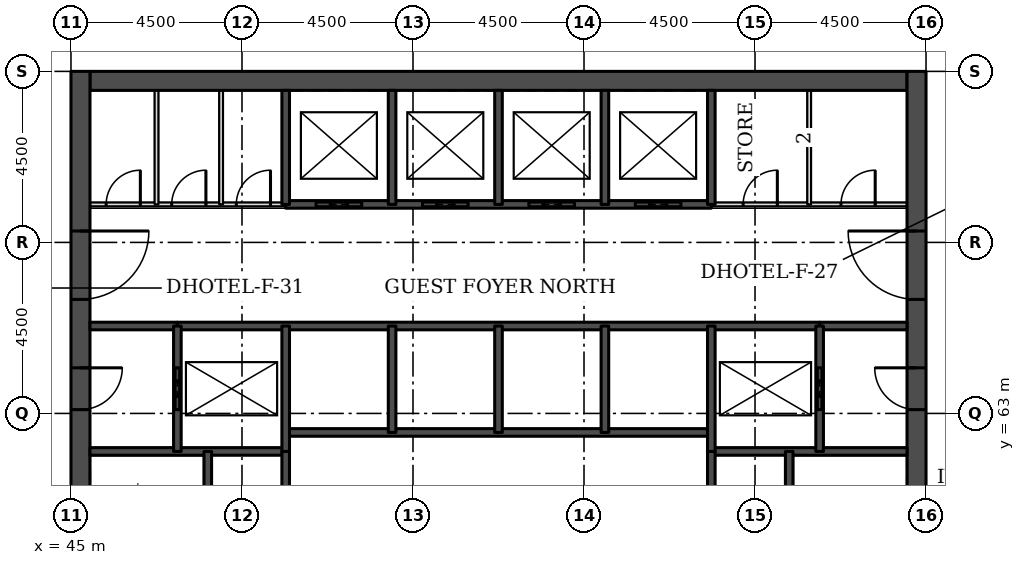
"""IFC4 building model, lengths in metres.
Left out: names, types, materials, properties, quantities, classifications, styles, units other than length and angle.
Written with IfcOpenShell. Run it as: python <this file> out.ifc"""

import sys

from ifc_helpers import new_model, si_unit, direction, frame, frame_2d, origin, place, context, subcontext, project, spatial, rectangle, extrude, element, fill, save


model = new_model("IFC4")
c1 = context("Model", 3, precision=1e-05, world=origin(), true_north=direction((0.0, 1.0)))
c2 = subcontext(c1, "Body", "Model", "MODEL_VIEW")
j1 = project(units=[si_unit("LENGTHUNIT", "METRE"), si_unit("PLANEANGLEUNIT", "RADIAN")], contexts=[c1])
p1 = place(None, origin())
s1 = spatial("IfcSite", under=j1, at=p1, CompositionType="ELEMENT")
p2 = place(p1, origin())
s2 = spatial("IfcBuilding", under=s1, at=p2, CompositionType="ELEMENT")
p3 = place(p2, frame((0.0, 0.0, 42.9)))
s3 = spatial("IfcBuildingStorey", under=s2, at=p3, CompositionType="ELEMENT", Elevation=42.9)
p4 = place(p3, frame((45.5, 71.75, 0.0), z_axis=(0.0, 0.0, 1.0), x_axis=(1.0, 0.0, 0.0)))
e1 = element("IfcWall", 1, at=p4, inside=s3, PredefinedType="SHEAR", context=c2, shape_type="SweptSolid", body=[
    extrude(rectangle(XDim=21.5, YDim=0.5, at=frame_2d((10.75, 0.0))), origin(), (0.0, 0.0, 1.0), 3.3),
])
p5 = place(p3, frame((45.25, 49.5, 0.0), z_axis=(0.0, 0.0, 1.0), x_axis=(0.0, 1.0, 0.0)))
e2 = element("IfcWall", 2, at=p5, inside=s3, PredefinedType="SHEAR", context=c2, shape_type="SweptSolid", body=[
    extrude(rectangle(XDim=22.5, YDim=0.5, at=frame_2d((11.25, 0.0))), origin(), (0.0, 0.0, 1.0), 3.3),
])
p6 = place(p5, frame((4.2, 0.0, 0.0)))
e3 = element("IfcOpeningElement", 3, at=p6, cuts=e2, PredefinedType="OPENING", context=c2, shape_type="SweptSolid", body=[
    extrude(rectangle(XDim=1.8, YDim=2.1, at=frame_2d((0.9, 1.05))), frame((0.0, 0.26, 0.0), z_axis=(0.0, -1.0, 0.0), x_axis=(1.0, 0.0, 0.0)), (0.0, 0.0, 1.0), 0.52),
])
p7 = place(p5, frame((6.9, 0.0, 0.0)))
e4 = element("IfcOpeningElement", 4, at=p7, cuts=e2, PredefinedType="OPENING", context=c2, shape_type="SweptSolid", body=[
    extrude(rectangle(XDim=1.1, YDim=2.1, at=frame_2d((0.55, 1.05))), frame((0.0, 0.26, 0.0), z_axis=(0.0, -1.0, 0.0), x_axis=(1.0, 0.0, 0.0)), (0.0, 0.0, 1.0), 0.52),
])
p8 = place(p5, frame((13.6, 0.0, 0.0)))
e5 = element("IfcOpeningElement", 5, at=p8, cuts=e2, PredefinedType="OPENING", context=c2, shape_type="SweptSolid", body=[
    extrude(rectangle(XDim=1.1, YDim=2.1, at=frame_2d((0.55, 1.05))), frame((0.0, 0.26, 0.0), z_axis=(0.0, -1.0, 0.0), x_axis=(1.0, 0.0, 0.0)), (0.0, 0.0, 1.0), 0.52),
])
p9 = place(p5, frame((16.5, 0.0, 0.0)))
e6 = element("IfcOpeningElement", 6, at=p9, cuts=e2, PredefinedType="OPENING", context=c2, shape_type="SweptSolid", body=[
    extrude(rectangle(XDim=1.8, YDim=2.1, at=frame_2d((0.9, 1.05))), frame((0.0, 0.26, 0.0), z_axis=(0.0, -1.0, 0.0), x_axis=(1.0, 0.0, 0.0)), (0.0, 0.0, 1.0), 0.52),
])
p10 = place(p3, frame((67.25, 49.5, 0.0), z_axis=(0.0, 0.0, 1.0), x_axis=(0.0, 1.0, 0.0)))
e7 = element("IfcWall", 7, at=p10, inside=s3, PredefinedType="SHEAR", context=c2, shape_type="SweptSolid", body=[
    extrude(rectangle(XDim=22.5, YDim=0.5, at=frame_2d((11.25, 0.0))), origin(), (0.0, 0.0, 1.0), 3.3),
])
p11 = place(p10, frame((4.2, 0.0, 0.0)))
e8 = element("IfcOpeningElement", 8, at=p11, cuts=e7, PredefinedType="OPENING", context=c2, shape_type="SweptSolid", body=[
    extrude(rectangle(XDim=1.8, YDim=2.1, at=frame_2d((0.9, 1.05))), frame((0.0, 0.26, 0.0), z_axis=(0.0, -1.0, 0.0), x_axis=(1.0, 0.0, 0.0)), (0.0, 0.0, 1.0), 0.52),
])
p12 = place(p10, frame((6.9, 0.0, 0.0)))
e9 = element("IfcOpeningElement", 9, at=p12, cuts=e7, PredefinedType="OPENING", context=c2, shape_type="SweptSolid", body=[
    extrude(rectangle(XDim=1.1, YDim=2.1, at=frame_2d((0.55, 1.05))), frame((0.0, 0.26, 0.0), z_axis=(0.0, -1.0, 0.0), x_axis=(1.0, 0.0, 0.0)), (0.0, 0.0, 1.0), 0.52),
])
p13 = place(p10, frame((13.6, 0.0, 0.0)))
e10 = element("IfcOpeningElement", 10, at=p13, cuts=e7, PredefinedType="OPENING", context=c2, shape_type="SweptSolid", body=[
    extrude(rectangle(XDim=1.1, YDim=2.1, at=frame_2d((0.55, 1.05))), frame((0.0, 0.26, 0.0), z_axis=(0.0, -1.0, 0.0), x_axis=(1.0, 0.0, 0.0)), (0.0, 0.0, 1.0), 0.52),
])
p14 = place(p10, frame((16.5, 0.0, 0.0)))
e11 = element("IfcOpeningElement", 11, at=p14, cuts=e7, PredefinedType="OPENING", context=c2, shape_type="SweptSolid", body=[
    extrude(rectangle(XDim=1.8, YDim=2.1, at=frame_2d((0.9, 1.05))), frame((0.0, 0.26, 0.0), z_axis=(0.0, -1.0, 0.0), x_axis=(1.0, 0.0, 0.0)), (0.0, 0.0, 1.0), 0.52),
])
for number, where, z_axis, x_axis in (
    (12, (45.5, 62.0, 0.0), (0.0, 0.0, 1.0), (1.0, 0.0, 0.0)),
    (13, (61.85, 62.0, 0.0), (0.0, 0.0, 1.0), (1.0, 0.0, 0.0)),
):
    element("IfcWall", number, at=place(p3, frame(where, z_axis=z_axis, x_axis=x_axis)), inside=s3, PredefinedType="SOLIDWALL", context=c2, shape_type="SweptSolid", body=[
        extrude(rectangle(XDim=5.15, YDim=0.2, at=frame_2d((2.575, 0.0))), origin(), (0.0, 0.0, 1.0), 3.08),
    ])
p15 = place(p3, frame((50.65, 62.5, 0.0), z_axis=(0.0, 0.0, 1.0), x_axis=(1.0, 0.0, 0.0)))
e14 = element("IfcWall", 14, at=p15, inside=s3, PredefinedType="SOLIDWALL", context=c2, shape_type="SweptSolid", body=[
    extrude(rectangle(XDim=11.2, YDim=0.2, at=frame_2d((5.6, 0.0))), origin(), (0.0, 0.0, 1.0), 3.3),
])
for number, where, z_axis, x_axis in (
    (15, (45.5, 65.3, 0.0), (0.0, 0.0, 1.0), (1.0, 0.0, 0.0)),
    (16, (64.7, 65.3, 0.0), (0.0, 0.0, 1.0), (1.0, 0.0, 0.0)),
):
    element("IfcWall", number, at=place(p3, frame(where, z_axis=z_axis, x_axis=x_axis)), inside=s3, PredefinedType="SOLIDWALL", context=c2, shape_type="SweptSolid", body=[
        extrude(rectangle(XDim=2.3, YDim=0.2, at=frame_2d((1.15, 0.0))), origin(), (0.0, 0.0, 1.0), 3.08),
    ])
p16 = place(p3, frame((47.8, 65.3, 0.0), z_axis=(0.0, 0.0, 1.0), x_axis=(1.0, 0.0, 0.0)))
e17 = element("IfcWall", 17, at=p16, inside=s3, PredefinedType="SOLIDWALL", context=c2, shape_type="SweptSolid", body=[
    extrude(rectangle(XDim=16.9, YDim=0.2, at=frame_2d((8.45, 0.0))), origin(), (0.0, 0.0, 1.0), 3.08),
])
p17 = place(p3, frame((45.5, 68.5, 0.0), z_axis=(0.0, 0.0, 1.0), x_axis=(1.0, 0.0, 0.0)))
e18 = element("IfcWall", 18, at=p17, inside=s3, PredefinedType="PARTITIONING", context=c2, shape_type="SweptSolid", body=[
    extrude(rectangle(XDim=5.15, YDim=0.1, at=frame_2d((2.575, 0.0))), origin(), (0.0, 0.0, 1.0), 3.08),
])
p18 = place(p17, frame((0.426, 0.0, 0.0)))
e19 = element("IfcOpeningElement", 19, at=p18, cuts=e18, PredefinedType="OPENING", context=c2, shape_type="SweptSolid", body=[
    extrude(rectangle(XDim=0.9, YDim=2.1, at=frame_2d((0.45, 1.05))), frame((0.0, 0.06, 0.0), z_axis=(0.0, -1.0, 0.0), x_axis=(1.0, 0.0, 0.0)), (0.0, 0.0, 1.0), 0.12),
])
p19 = place(p17, frame((2.151, 0.0, 0.0)))
e20 = element("IfcOpeningElement", 20, at=p19, cuts=e18, PredefinedType="OPENING", context=c2, shape_type="SweptSolid", body=[
    extrude(rectangle(XDim=0.9, YDim=2.1, at=frame_2d((0.45, 1.05))), frame((0.0, 0.06, 0.0), z_axis=(0.0, -1.0, 0.0), x_axis=(1.0, 0.0, 0.0)), (0.0, 0.0, 1.0), 0.12),
])
p20 = place(p17, frame((3.85, 0.0, 0.0)))
e21 = element("IfcOpeningElement", 21, at=p20, cuts=e18, PredefinedType="OPENING", context=c2, shape_type="SweptSolid", body=[
    extrude(rectangle(XDim=0.9, YDim=2.1, at=frame_2d((0.45, 1.05))), frame((0.0, 0.06, 0.0), z_axis=(0.0, -1.0, 0.0), x_axis=(1.0, 0.0, 0.0)), (0.0, 0.0, 1.0), 0.12),
])
p21 = place(p3, frame((61.85, 68.5, 0.0), z_axis=(0.0, 0.0, 1.0), x_axis=(1.0, 0.0, 0.0)))
e22 = element("IfcWall", 22, at=p21, inside=s3, PredefinedType="PARTITIONING", context=c2, shape_type="SweptSolid", body=[
    extrude(rectangle(XDim=5.15, YDim=0.1, at=frame_2d((2.575, 0.0))), origin(), (0.0, 0.0, 1.0), 3.08),
])
p22 = place(p21, frame((3.413, 0.0, 0.0)))
e23 = element("IfcOpeningElement", 23, at=p22, cuts=e22, PredefinedType="OPENING", context=c2, shape_type="SweptSolid", body=[
    extrude(rectangle(XDim=0.9, YDim=2.1, at=frame_2d((0.45, 1.05))), frame((0.0, 0.06, 0.0), z_axis=(0.0, -1.0, 0.0), x_axis=(1.0, 0.0, 0.0)), (0.0, 0.0, 1.0), 0.12),
])
p23 = place(p21, frame((0.837, 0.0, 0.0)))
e24 = element("IfcOpeningElement", 24, at=p23, cuts=e22, PredefinedType="OPENING", context=c2, shape_type="SweptSolid", body=[
    extrude(rectangle(XDim=0.9, YDim=2.1, at=frame_2d((0.45, 1.05))), frame((0.0, 0.06, 0.0), z_axis=(0.0, -1.0, 0.0), x_axis=(1.0, 0.0, 0.0)), (0.0, 0.0, 1.0), 0.12),
])
p24 = place(p3, frame((50.65, 68.5, 0.0), z_axis=(0.0, 0.0, 1.0), x_axis=(1.0, 0.0, 0.0)))
e25 = element("IfcWall", 25, at=p24, inside=s3, PredefinedType="SOLIDWALL", context=c2, shape_type="SweptSolid", body=[
    extrude(rectangle(XDim=11.2, YDim=0.2, at=frame_2d((5.6, 0.0))), origin(), (0.0, 0.0, 1.0), 3.08),
])
p25 = place(p24, frame((0.8, 0.0, 0.0)))
e26 = element("IfcOpeningElement", 26, at=p25, cuts=e25, PredefinedType="OPENING", context=c2, shape_type="SweptSolid", body=[
    extrude(rectangle(XDim=1.2, YDim=2.1, at=frame_2d((0.6, 1.05))), frame((0.0, 0.11, 0.0), z_axis=(0.0, -1.0, 0.0), x_axis=(1.0, 0.0, 0.0)), (0.0, 0.0, 1.0), 0.22),
])
p26 = place(p24, frame((3.6, 0.0, 0.0)))
e27 = element("IfcOpeningElement", 27, at=p26, cuts=e25, PredefinedType="OPENING", context=c2, shape_type="SweptSolid", body=[
    extrude(rectangle(XDim=1.2, YDim=2.1, at=frame_2d((0.6, 1.05))), frame((0.0, 0.11, 0.0), z_axis=(0.0, -1.0, 0.0), x_axis=(1.0, 0.0, 0.0)), (0.0, 0.0, 1.0), 0.22),
])
p27 = place(p24, frame((6.4, 0.0, 0.0)))
e28 = element("IfcOpeningElement", 28, at=p27, cuts=e25, PredefinedType="OPENING", context=c2, shape_type="SweptSolid", body=[
    extrude(rectangle(XDim=1.2, YDim=2.1, at=frame_2d((0.6, 1.05))), frame((0.0, 0.11, 0.0), z_axis=(0.0, -1.0, 0.0), x_axis=(1.0, 0.0, 0.0)), (0.0, 0.0, 1.0), 0.22),
])
p28 = place(p24, frame((9.2, 0.0, 0.0)))
e29 = element("IfcOpeningElement", 29, at=p28, cuts=e25, PredefinedType="OPENING", context=c2, shape_type="SweptSolid", body=[
    extrude(rectangle(XDim=1.2, YDim=2.1, at=frame_2d((0.6, 1.05))), frame((0.0, 0.11, 0.0), z_axis=(0.0, -1.0, 0.0), x_axis=(1.0, 0.0, 0.0)), (0.0, 0.0, 1.0), 0.22),
])
p29 = place(p3, frame((47.251, 68.5, 0.0), z_axis=(0.0, 0.0, 1.0), x_axis=(0.0, 1.0, 0.0)))
e30 = element("IfcWall", 30, at=p29, inside=s3, PredefinedType="PARTITIONING", context=c2, shape_type="SweptSolid", body=[
    extrude(rectangle(XDim=3.0, YDim=0.1, at=frame_2d((1.5, 0.0))), origin(), (0.0, 0.0, 1.0), 3.08),
])
p30 = place(p3, frame((47.8, 62.0, 0.0), z_axis=(0.0, 0.0, 1.0), x_axis=(0.0, 1.0, 0.0)))
e31 = element("IfcWall", 31, at=p30, inside=s3, PredefinedType="SOLIDWALL", context=c2, shape_type="SweptSolid", body=[
    extrude(rectangle(XDim=3.3, YDim=0.2, at=frame_2d((1.65, 0.0))), origin(), (0.0, 0.0, 1.0), 3.08),
])
p31 = place(p30, frame((1.1, 0.0, 0.0)))
e32 = element("IfcOpeningElement", 32, at=p31, cuts=e31, PredefinedType="OPENING", context=c2, shape_type="SweptSolid", body=[
    extrude(rectangle(XDim=1.1, YDim=2.1, at=frame_2d((0.55, 1.05))), frame((0.0, 0.11, 0.0), z_axis=(0.0, -1.0, 0.0), x_axis=(1.0, 0.0, 0.0)), (0.0, 0.0, 1.0), 0.22),
])
p32 = place(p3, frame((48.6, 56.2, 0.0), z_axis=(0.0, 0.0, 1.0), x_axis=(0.0, 1.0, 0.0)))
e33 = element("IfcWall", 33, at=p32, inside=s3, PredefinedType="SOLIDWALL", context=c2, shape_type="SweptSolid", body=[
    extrude(rectangle(XDim=5.8, YDim=0.2, at=frame_2d((2.9, 0.0))), origin(), (0.0, 0.0, 1.0), 3.08),
])
p33 = place(p3, frame((48.95, 68.5, 0.0), z_axis=(0.0, 0.0, 1.0), x_axis=(0.0, 1.0, 0.0)))
e34 = element("IfcWall", 34, at=p33, inside=s3, PredefinedType="PARTITIONING", context=c2, shape_type="SweptSolid", body=[
    extrude(rectangle(XDim=3.0, YDim=0.1, at=frame_2d((1.5, 0.0))), origin(), (0.0, 0.0, 1.0), 3.08),
])
p34 = place(p3, frame((50.65, 59.0, 0.0), z_axis=(0.0, 0.0, 1.0), x_axis=(0.0, 1.0, 0.0)))
e35 = element("IfcWall", 35, at=p34, inside=s3, PredefinedType="SOLIDWALL", context=c2, shape_type="SweptSolid", body=[
    extrude(rectangle(XDim=3.0, YDim=0.2, at=frame_2d((1.5, 0.0))), origin(), (0.0, 0.0, 1.0), 3.3),
])
p35 = place(p3, frame((50.65, 62.0, 0.0), z_axis=(0.0, 0.0, 1.0), x_axis=(0.0, 1.0, 0.0)))
e36 = element("IfcWall", 36, at=p35, inside=s3, PredefinedType="SOLIDWALL", context=c2, shape_type="SweptSolid", body=[
    extrude(rectangle(XDim=3.3, YDim=0.2, at=frame_2d((1.65, 0.0))), origin(), (0.0, 0.0, 1.0), 3.08),
])
p36 = place(p3, frame((50.65, 68.5, 0.0), z_axis=(0.0, 0.0, 1.0), x_axis=(0.0, 1.0, 0.0)))
e37 = element("IfcWall", 37, at=p36, inside=s3, PredefinedType="SOLIDWALL", context=c2, shape_type="SweptSolid", body=[
    extrude(rectangle(XDim=3.0, YDim=0.2, at=frame_2d((1.5, 0.0))), origin(), (0.0, 0.0, 1.0), 3.08),
])
p37 = place(p3, frame((53.45, 62.5, 0.0), z_axis=(0.0, 0.0, 1.0), x_axis=(0.0, 1.0, 0.0)))
e38 = element("IfcWall", 38, at=p37, inside=s3, PredefinedType="SOLIDWALL", context=c2, shape_type="SweptSolid", body=[
    extrude(rectangle(XDim=2.8, YDim=0.2, at=frame_2d((1.4, 0.0))), origin(), (0.0, 0.0, 1.0), 3.08),
])
p38 = place(p3, frame((53.45, 68.5, 0.0), z_axis=(0.0, 0.0, 1.0), x_axis=(0.0, 1.0, 0.0)))
e39 = element("IfcWall", 39, at=p38, inside=s3, PredefinedType="SOLIDWALL", context=c2, shape_type="SweptSolid", body=[
    extrude(rectangle(XDim=3.0, YDim=0.2, at=frame_2d((1.5, 0.0))), origin(), (0.0, 0.0, 1.0), 3.08),
])
p39 = place(p3, frame((56.25, 62.5, 0.0), z_axis=(0.0, 0.0, 1.0), x_axis=(0.0, 1.0, 0.0)))
e40 = element("IfcWall", 40, at=p39, inside=s3, PredefinedType="SOLIDWALL", context=c2, shape_type="SweptSolid", body=[
    extrude(rectangle(XDim=2.8, YDim=0.2, at=frame_2d((1.4, 0.0))), origin(), (0.0, 0.0, 1.0), 3.08),
])
p40 = place(p3, frame((56.25, 68.5, 0.0), z_axis=(0.0, 0.0, 1.0), x_axis=(0.0, 1.0, 0.0)))
e41 = element("IfcWall", 41, at=p40, inside=s3, PredefinedType="SOLIDWALL", context=c2, shape_type="SweptSolid", body=[
    extrude(rectangle(XDim=3.0, YDim=0.2, at=frame_2d((1.5, 0.0))), origin(), (0.0, 0.0, 1.0), 3.08),
])
p41 = place(p3, frame((59.05, 62.5, 0.0), z_axis=(0.0, 0.0, 1.0), x_axis=(0.0, 1.0, 0.0)))
e42 = element("IfcWall", 42, at=p41, inside=s3, PredefinedType="SOLIDWALL", context=c2, shape_type="SweptSolid", body=[
    extrude(rectangle(XDim=2.8, YDim=0.2, at=frame_2d((1.4, 0.0))), origin(), (0.0, 0.0, 1.0), 3.08),
])
p42 = place(p3, frame((59.05, 68.5, 0.0), z_axis=(0.0, 0.0, 1.0), x_axis=(0.0, 1.0, 0.0)))
e43 = element("IfcWall", 43, at=p42, inside=s3, PredefinedType="SOLIDWALL", context=c2, shape_type="SweptSolid", body=[
    extrude(rectangle(XDim=3.0, YDim=0.2, at=frame_2d((1.5, 0.0))), origin(), (0.0, 0.0, 1.0), 3.08),
])
p43 = place(p3, frame((61.85, 59.0, 0.0), z_axis=(0.0, 0.0, 1.0), x_axis=(0.0, 1.0, 0.0)))
e44 = element("IfcWall", 44, at=p43, inside=s3, PredefinedType="SOLIDWALL", context=c2, shape_type="SweptSolid", body=[
    extrude(rectangle(XDim=3.0, YDim=0.2, at=frame_2d((1.5, 0.0))), origin(), (0.0, 0.0, 1.0), 3.3),
])
p44 = place(p3, frame((61.85, 62.0, 0.0), z_axis=(0.0, 0.0, 1.0), x_axis=(0.0, 1.0, 0.0)))
e45 = element("IfcWall", 45, at=p44, inside=s3, PredefinedType="SOLIDWALL", context=c2, shape_type="SweptSolid", body=[
    extrude(rectangle(XDim=3.3, YDim=0.2, at=frame_2d((1.65, 0.0))), origin(), (0.0, 0.0, 1.0), 3.08),
])
p45 = place(p3, frame((61.85, 68.5, 0.0), z_axis=(0.0, 0.0, 1.0), x_axis=(0.0, 1.0, 0.0)))
e46 = element("IfcWall", 46, at=p45, inside=s3, PredefinedType="SOLIDWALL", context=c2, shape_type="SweptSolid", body=[
    extrude(rectangle(XDim=3.0, YDim=0.2, at=frame_2d((1.5, 0.0))), origin(), (0.0, 0.0, 1.0), 3.08),
])
p46 = place(p3, frame((63.9, 56.2, 0.0), z_axis=(0.0, 0.0, 1.0), x_axis=(0.0, 1.0, 0.0)))
e47 = element("IfcWall", 47, at=p46, inside=s3, PredefinedType="SOLIDWALL", context=c2, shape_type="SweptSolid", body=[
    extrude(rectangle(XDim=5.8, YDim=0.2, at=frame_2d((2.9, 0.0))), origin(), (0.0, 0.0, 1.0), 3.08),
])
p47 = place(p3, frame((64.425, 68.5, 0.0), z_axis=(0.0, 0.0, 1.0), x_axis=(0.0, 1.0, 0.0)))
e48 = element("IfcWall", 48, at=p47, inside=s3, PredefinedType="PARTITIONING", context=c2, shape_type="SweptSolid", body=[
    extrude(rectangle(XDim=3.0, YDim=0.1, at=frame_2d((1.5, 0.0))), origin(), (0.0, 0.0, 1.0), 3.08),
])
p48 = place(p3, frame((64.7, 62.0, 0.0), z_axis=(0.0, 0.0, 1.0), x_axis=(0.0, 1.0, 0.0)))
e49 = element("IfcWall", 49, at=p48, inside=s3, PredefinedType="SOLIDWALL", context=c2, shape_type="SweptSolid", body=[
    extrude(rectangle(XDim=3.3, YDim=0.2, at=frame_2d((1.65, 0.0))), origin(), (0.0, 0.0, 1.0), 3.08),
])
p49 = place(p48, frame((1.1, 0.0, 0.0)))
e50 = element("IfcOpeningElement", 50, at=p49, cuts=e49, PredefinedType="OPENING", context=c2, shape_type="SweptSolid", body=[
    extrude(rectangle(XDim=1.1, YDim=2.1, at=frame_2d((0.55, 1.05))), frame((0.0, 0.11, 0.0), z_axis=(0.0, -1.0, 0.0), x_axis=(1.0, 0.0, 0.0)), (0.0, 0.0, 1.0), 0.22),
])
p50 = place(p25, origin())
e51 = element("IfcDoor", 51, at=p50, inside=s3, OperationType="DOUBLE_DOOR_SLIDING", PredefinedType="DOOR", context=c2, shape_type="SweptSolid", body=[
    extrude(rectangle(XDim=1.2, YDim=2.1, at=frame_2d((0.6, 1.05))), frame((0.0, 0.025, 0.0), z_axis=(0.0, -1.0, 0.0), x_axis=(1.0, 0.0, 0.0)), (0.0, 0.0, 1.0), 0.05),
])
fill(e26, e51)
p51 = place(p26, origin())
e52 = element("IfcDoor", 52, at=p51, inside=s3, OperationType="DOUBLE_DOOR_SLIDING", PredefinedType="DOOR", context=c2, shape_type="SweptSolid", body=[
    extrude(rectangle(XDim=1.2, YDim=2.1, at=frame_2d((0.6, 1.05))), frame((0.0, 0.025, 0.0), z_axis=(0.0, -1.0, 0.0), x_axis=(1.0, 0.0, 0.0)), (0.0, 0.0, 1.0), 0.05),
])
fill(e27, e52)
p52 = place(p27, origin())
e53 = element("IfcDoor", 53, at=p52, inside=s3, OperationType="DOUBLE_DOOR_SLIDING", PredefinedType="DOOR", context=c2, shape_type="SweptSolid", body=[
    extrude(rectangle(XDim=1.2, YDim=2.1, at=frame_2d((0.6, 1.05))), frame((0.0, 0.025, 0.0), z_axis=(0.0, -1.0, 0.0), x_axis=(1.0, 0.0, 0.0)), (0.0, 0.0, 1.0), 0.05),
])
fill(e28, e53)
p53 = place(p28, origin())
e54 = element("IfcDoor", 54, at=p53, inside=s3, OperationType="DOUBLE_DOOR_SLIDING", PredefinedType="DOOR", context=c2, shape_type="SweptSolid", body=[
    extrude(rectangle(XDim=1.2, YDim=2.1, at=frame_2d((0.6, 1.05))), frame((0.0, 0.025, 0.0), z_axis=(0.0, -1.0, 0.0), x_axis=(1.0, 0.0, 0.0)), (0.0, 0.0, 1.0), 0.05),
])
fill(e29, e54)
p54 = place(p31, origin())
e55 = element("IfcDoor", 55, at=p54, inside=s3, OperationType="DOUBLE_DOOR_SLIDING", PredefinedType="DOOR", context=c2, shape_type="SweptSolid", body=[
    extrude(rectangle(XDim=1.1, YDim=2.1, at=frame_2d((0.55, 1.05))), frame((0.0, 0.025, 0.0), z_axis=(0.0, -1.0, 0.0), x_axis=(1.0, 0.0, 0.0)), (0.0, 0.0, 1.0), 0.05),
])
fill(e32, e55)
p55 = place(p49, origin())
e56 = element("IfcDoor", 56, at=p55, inside=s3, OperationType="DOUBLE_DOOR_SLIDING", PredefinedType="DOOR", context=c2, shape_type="SweptSolid", body=[
    extrude(rectangle(XDim=1.1, YDim=2.1, at=frame_2d((0.55, 1.05))), frame((0.0, 0.025, 0.0), z_axis=(0.0, -1.0, 0.0), x_axis=(1.0, 0.0, 0.0)), (0.0, 0.0, 1.0), 0.05),
])
fill(e50, e56)
p56 = place(p8, frame((1.1, 0.0, 0.0), z_axis=(0.0, 0.0, 1.0), x_axis=(-1.0, 0.0, 0.0)))
e57 = element("IfcDoor", 57, at=p56, inside=s3, OperationType="SINGLE_SWING_LEFT", PredefinedType="DOOR", context=c2, shape_type="SweptSolid", body=[
    extrude(rectangle(XDim=1.1, YDim=2.1, at=frame_2d((0.55, 1.05))), frame((0.0, 0.025, 0.0), z_axis=(0.0, -1.0, 0.0), x_axis=(1.0, 0.0, 0.0)), (0.0, 0.0, 1.0), 0.05),
])
fill(e5, e57)
p57 = place(p9, frame((1.8, 0.0, 0.0), z_axis=(0.0, 0.0, 1.0), x_axis=(-1.0, 0.0, 0.0)))
e58 = element("IfcDoor", 58, at=p57, inside=s3, OperationType="SINGLE_SWING_LEFT", PredefinedType="DOOR", context=c2, shape_type="SweptSolid", body=[
    extrude(rectangle(XDim=1.8, YDim=2.1, at=frame_2d((0.9, 1.05))), frame((0.0, 0.025, 0.0), z_axis=(0.0, -1.0, 0.0), x_axis=(1.0, 0.0, 0.0)), (0.0, 0.0, 1.0), 0.05),
])
fill(e6, e58)
p58 = place(p13, origin())
e59 = element("IfcDoor", 59, at=p58, inside=s3, OperationType="SINGLE_SWING_RIGHT", PredefinedType="DOOR", context=c2, shape_type="SweptSolid", body=[
    extrude(rectangle(XDim=1.1, YDim=2.1, at=frame_2d((0.55, 1.05))), frame((0.0, 0.025, 0.0), z_axis=(0.0, -1.0, 0.0), x_axis=(1.0, 0.0, 0.0)), (0.0, 0.0, 1.0), 0.05),
])
fill(e10, e59)
p59 = place(p14, origin())
e60 = element("IfcDoor", 60, at=p59, inside=s3, OperationType="SINGLE_SWING_RIGHT", PredefinedType="DOOR", context=c2, shape_type="SweptSolid", body=[
    extrude(rectangle(XDim=1.8, YDim=2.1, at=frame_2d((0.9, 1.05))), frame((0.0, 0.025, 0.0), z_axis=(0.0, -1.0, 0.0), x_axis=(1.0, 0.0, 0.0)), (0.0, 0.0, 1.0), 0.05),
])
fill(e11, e60)
p60 = place(p22, origin())
e61 = element("IfcDoor", 61, at=p60, inside=s3, OperationType="SINGLE_SWING_RIGHT", PredefinedType="DOOR", context=c2, shape_type="SweptSolid", body=[
    extrude(rectangle(XDim=0.9, YDim=2.1, at=frame_2d((0.45, 1.05))), frame((0.0, 0.025, 0.0), z_axis=(0.0, -1.0, 0.0), x_axis=(1.0, 0.0, 0.0)), (0.0, 0.0, 1.0), 0.05),
])
fill(e23, e61)
p61 = place(p23, origin())
e62 = element("IfcDoor", 62, at=p61, inside=s3, OperationType="SINGLE_SWING_RIGHT", PredefinedType="DOOR", context=c2, shape_type="SweptSolid", body=[
    extrude(rectangle(XDim=0.9, YDim=2.1, at=frame_2d((0.45, 1.05))), frame((0.0, 0.025, 0.0), z_axis=(0.0, -1.0, 0.0), x_axis=(1.0, 0.0, 0.0)), (0.0, 0.0, 1.0), 0.05),
])
fill(e24, e62)
p62 = place(p18, origin())
e63 = element("IfcDoor", 63, at=p62, inside=s3, OperationType="SINGLE_SWING_RIGHT", PredefinedType="DOOR", context=c2, shape_type="SweptSolid", body=[
    extrude(rectangle(XDim=0.9, YDim=2.1, at=frame_2d((0.45, 1.05))), frame((0.0, 0.025, 0.0), z_axis=(0.0, -1.0, 0.0), x_axis=(1.0, 0.0, 0.0)), (0.0, 0.0, 1.0), 0.05),
])
fill(e19, e63)
p63 = place(p19, origin())
e64 = element("IfcDoor", 64, at=p63, inside=s3, OperationType="SINGLE_SWING_RIGHT", PredefinedType="DOOR", context=c2, shape_type="SweptSolid", body=[
    extrude(rectangle(XDim=0.9, YDim=2.1, at=frame_2d((0.45, 1.05))), frame((0.0, 0.025, 0.0), z_axis=(0.0, -1.0, 0.0), x_axis=(1.0, 0.0, 0.0)), (0.0, 0.0, 1.0), 0.05),
])
fill(e20, e64)
p64 = place(p20, origin())
e65 = element("IfcDoor", 65, at=p64, inside=s3, OperationType="SINGLE_SWING_RIGHT", PredefinedType="DOOR", context=c2, shape_type="SweptSolid", body=[
    extrude(rectangle(XDim=0.9, YDim=2.1, at=frame_2d((0.45, 1.05))), frame((0.0, 0.025, 0.0), z_axis=(0.0, -1.0, 0.0), x_axis=(1.0, 0.0, 0.0)), (0.0, 0.0, 1.0), 0.05),
])
fill(e21, e65)
save(model, sys.argv[1])
